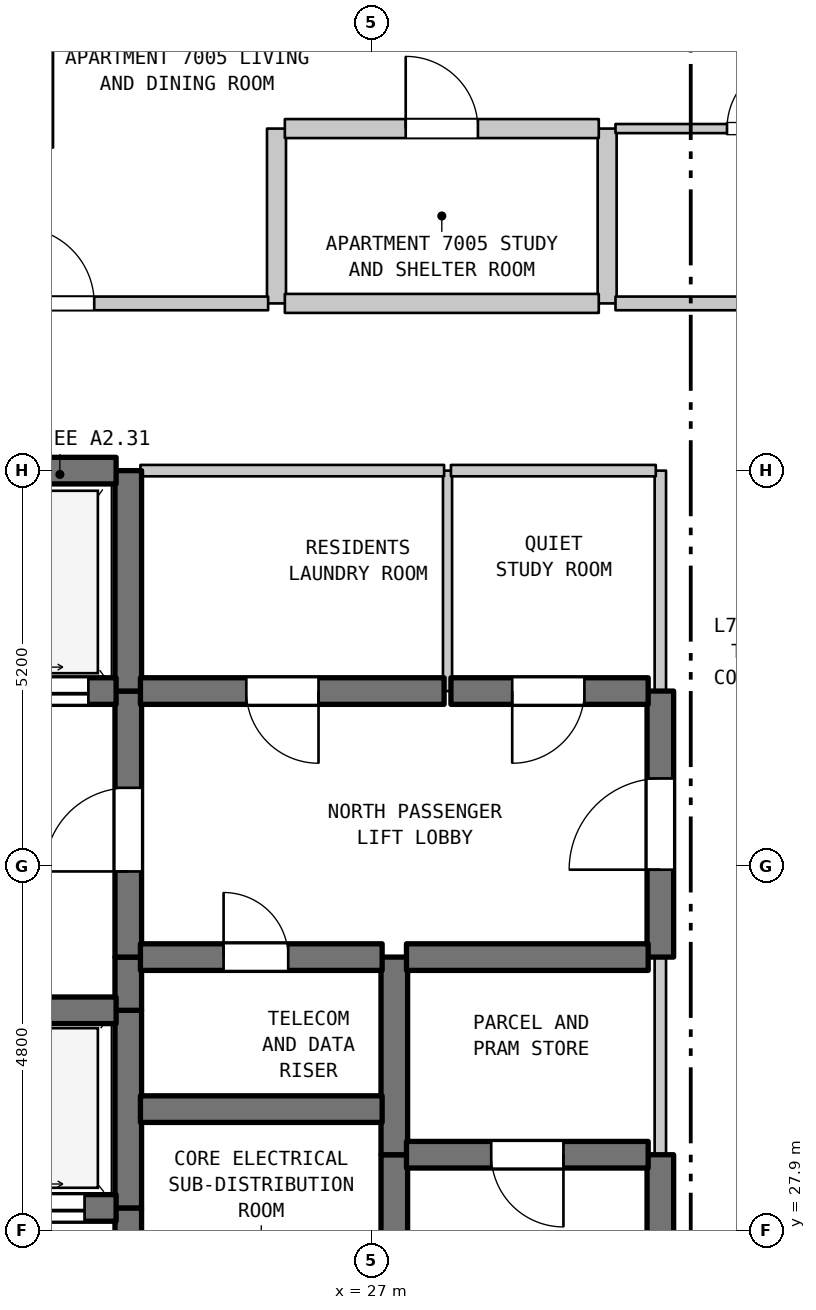
"""IFC4 building model, lengths in metres.
Left out: names, types, materials, properties, quantities, classifications, styles, units other than length and angle.
Written with IfcOpenShell. Run it as: python <this file> out.ifc"""

import sys

from ifc_helpers import new_model, si_unit, direction, frame, frame_2d, origin, place, context, subcontext, project, spatial, rectangle, extrude, element, fill, save


model = new_model("IFC4")
c1 = context("Model", 3, precision=1e-05, world=origin(), true_north=direction((0.0, 1.0)))
c2 = subcontext(c1, "Body", "Model", "MODEL_VIEW")
j1 = project(units=[si_unit("LENGTHUNIT", "METRE"), si_unit("PLANEANGLEUNIT", "RADIAN")], contexts=[c1])
p1 = place(None, origin())
s1 = spatial("IfcSite", under=j1, at=p1, CompositionType="ELEMENT")
p2 = place(p1, origin())
s2 = spatial("IfcBuilding", under=s1, at=p2, CompositionType="ELEMENT")
p3 = place(p2, frame((0.0, 0.0, 280.6)))
s3 = spatial("IfcBuildingStorey", under=s2, at=p3, CompositionType="ELEMENT", Elevation=280.6)
p4 = place(p3, frame((22.75, 42.15, 0.0), z_axis=(0.0, 0.0, 1.0), x_axis=(0.0, 1.0, 0.0)))
e1 = element("IfcWall", 1, at=p4, inside=s3, PredefinedType="PARTITIONING", context=c2, shape_type="SweptSolid", body=[
    extrude(rectangle(XDim=3.15, YDim=0.12, at=frame_2d((1.575, 0.0))), origin(), (0.0, 0.0, 1.0), 3.39),
])
p5 = place(p3, frame((23.8, 26.1, 0.0), z_axis=(0.0, 0.0, 1.0), x_axis=(0.0, 1.0, 0.0)))
e2 = element("IfcWall", 2, at=p5, inside=s3, PredefinedType="SHEAR", context=c2, shape_type="SweptSolid", body=[
    extrude(rectangle(XDim=2.1, YDim=0.35, at=frame_2d((1.05, 0.0))), origin(), (0.0, 0.0, 1.0), 3.39),
])
p6 = place(p5, frame((0.6, 0.0, 0.0)))
e3 = element("IfcOpeningElement", 3, at=p6, cuts=e2, PredefinedType="OPENING", context=c2, shape_type="SweptSolid", body=[
    extrude(rectangle(XDim=0.9, YDim=2.15, at=frame_2d((0.45, 1.075))), frame((0.0, 0.185, 0.0), z_axis=(0.0, -1.0, 0.0), x_axis=(1.0, 0.0, 0.0)), (0.0, 0.0, 1.0), 0.37),
])
p7 = place(p3, frame((23.8, 28.2, 0.0), z_axis=(0.0, 0.0, 1.0), x_axis=(0.0, 1.0, 0.0)))
e4 = element("IfcWall", 4, at=p7, inside=s3, PredefinedType="SHEAR", context=c2, shape_type="SweptSolid", body=[
    extrude(rectangle(XDim=2.6, YDim=0.35, at=frame_2d((1.3, 0.0))), origin(), (0.0, 0.0, 1.0), 3.39),
])
p8 = place(p3, frame((23.8, 30.8, 0.0), z_axis=(0.0, 0.0, 1.0), x_axis=(0.0, 1.0, 0.0)))
e5 = element("IfcWall", 5, at=p8, inside=s3, PredefinedType="SHEAR", context=c2, shape_type="SweptSolid", body=[
    extrude(rectangle(XDim=0.7, YDim=0.35, at=frame_2d((0.35, 0.0))), origin(), (0.0, 0.0, 1.0), 3.39),
])
p9 = place(p3, frame((23.8, 31.5, 0.0), z_axis=(0.0, 0.0, 1.0), x_axis=(0.0, 1.0, 0.0)))
e6 = element("IfcWall", 6, at=p9, inside=s3, PredefinedType="SHEAR", context=c2, shape_type="SweptSolid", body=[
    extrude(rectangle(XDim=3.5, YDim=0.35, at=frame_2d((1.75, 0.0))), origin(), (0.0, 0.0, 1.0), 3.39),
])
p10 = place(p9, frame((1.127, 0.0, 0.0)))
e7 = element("IfcOpeningElement", 7, at=p10, cuts=e6, PredefinedType="OPENING", context=c2, shape_type="SweptSolid", body=[
    extrude(rectangle(XDim=1.1, YDim=2.15, at=frame_2d((0.55, 1.075))), frame((0.0, 0.185, 0.0), z_axis=(0.0, -1.0, 0.0), x_axis=(1.0, 0.0, 0.0)), (0.0, 0.0, 1.0), 0.37),
])
p11 = place(p3, frame((23.8, 35.0, 0.0), z_axis=(0.0, 0.0, 1.0), x_axis=(0.0, 1.0, 0.0)))
e8 = element("IfcWall", 8, at=p11, inside=s3, PredefinedType="SHEAR", context=c2, shape_type="SweptSolid", body=[
    extrude(rectangle(XDim=2.9, YDim=0.35, at=frame_2d((1.45, 0.0))), origin(), (0.0, 0.0, 1.0), 3.39),
])
p12 = place(p3, frame((25.75, 40.1, 0.0), z_axis=(0.0, 0.0, 1.0), x_axis=(0.0, 1.0, 0.0)))
e9 = element("IfcWall", 9, at=p12, inside=s3, PredefinedType="STANDARD", context=c2, shape_type="SweptSolid", body=[
    extrude(rectangle(XDim=2.3, YDim=0.25, at=frame_2d((1.15, 0.0))), origin(), (0.0, 0.0, 1.0), 3.39),
])
p13 = place(p3, frame((27.3, 26.1, 0.0), z_axis=(0.0, 0.0, 1.0), x_axis=(0.0, 1.0, 0.0)))
e10 = element("IfcWall", 10, at=p13, inside=s3, PredefinedType="SHEAR", context=c2, shape_type="SweptSolid", body=[
    extrude(rectangle(XDim=2.8, YDim=0.35, at=frame_2d((1.4, 0.0))), origin(), (0.0, 0.0, 1.0), 3.39),
])
p14 = place(p3, frame((27.3, 28.9, 0.0), z_axis=(0.0, 0.0, 1.0), x_axis=(0.0, 1.0, 0.0)))
e11 = element("IfcWall", 11, at=p14, inside=s3, PredefinedType="SHEAR", context=c2, shape_type="SweptSolid", body=[
    extrude(rectangle(XDim=2.6, YDim=0.35, at=frame_2d((1.3, 0.0))), origin(), (0.0, 0.0, 1.0), 3.39),
])
p15 = place(p3, frame((28.0, 35.0, 0.0), z_axis=(0.0, 0.0, 1.0), x_axis=(0.0, 1.0, 0.0)))
e12 = element("IfcWall", 12, at=p15, inside=s3, PredefinedType="PARTITIONING", context=c2, shape_type="SweptSolid", body=[
    extrude(rectangle(XDim=2.9, YDim=0.12, at=frame_2d((1.45, 0.0))), origin(), (0.0, 0.0, 1.0), 3.39),
])
p16 = place(p3, frame((30.1, 40.1, 0.0), z_axis=(0.0, 0.0, 1.0), x_axis=(0.0, 1.0, 0.0)))
e13 = element("IfcWall", 13, at=p16, inside=s3, PredefinedType="STANDARD", context=c2, shape_type="SweptSolid", body=[
    extrude(rectangle(XDim=2.3, YDim=0.25, at=frame_2d((1.15, 0.0))), origin(), (0.0, 0.0, 1.0), 3.39),
])
p17 = place(p3, frame((30.8, 25.6, 0.0), z_axis=(0.0, 0.0, 1.0), x_axis=(0.0, 1.0, 0.0)))
e14 = element("IfcWall", 14, at=p17, inside=s3, PredefinedType="SHEAR", context=c2, shape_type="SweptSolid", body=[
    extrude(rectangle(XDim=3.3, YDim=0.35, at=frame_2d((1.65, 0.0))), origin(), (0.0, 0.0, 1.0), 3.39),
])
p18 = place(p17, frame((0.978, 0.0, 0.0)))
e15 = element("IfcOpeningElement", 15, at=p18, cuts=e14, PredefinedType="OPENING", context=c2, shape_type="SweptSolid", body=[
    extrude(rectangle(XDim=1.2, YDim=2.2, at=frame_2d((0.6, 1.1))), frame((0.0, 0.185, 0.0), z_axis=(0.0, -1.0, 0.0), x_axis=(1.0, 0.0, 0.0)), (0.0, 0.0, 1.0), 0.37),
])
p19 = place(p3, frame((30.8, 28.9, 0.0), z_axis=(0.0, 0.0, 1.0), x_axis=(0.0, 1.0, 0.0)))
e16 = element("IfcWall", 16, at=p19, inside=s3, PredefinedType="STANDARD", context=c2, shape_type="SweptSolid", body=[
    extrude(rectangle(XDim=2.6, YDim=0.15, at=frame_2d((1.3, 0.0))), origin(), (0.0, 0.0, 1.0), 3.39),
])
p20 = place(p3, frame((30.8, 31.5, 0.0), z_axis=(0.0, 0.0, 1.0), x_axis=(0.0, 1.0, 0.0)))
e17 = element("IfcWall", 17, at=p20, inside=s3, PredefinedType="SHEAR", context=c2, shape_type="SweptSolid", body=[
    extrude(rectangle(XDim=3.5, YDim=0.35, at=frame_2d((1.75, 0.0))), origin(), (0.0, 0.0, 1.0), 3.39),
])
p21 = place(p20, frame((1.15, 0.0, 0.0)))
e18 = element("IfcOpeningElement", 18, at=p21, cuts=e17, PredefinedType="OPENING", context=c2, shape_type="SweptSolid", body=[
    extrude(rectangle(XDim=1.2, YDim=2.2, at=frame_2d((0.6, 1.1))), frame((0.0, 0.185, 0.0), z_axis=(0.0, -1.0, 0.0), x_axis=(1.0, 0.0, 0.0)), (0.0, 0.0, 1.0), 0.37),
])
p22 = place(p3, frame((30.8, 35.0, 0.0), z_axis=(0.0, 0.0, 1.0), x_axis=(0.0, 1.0, 0.0)))
e19 = element("IfcWall", 19, at=p22, inside=s3, PredefinedType="STANDARD", context=c2, shape_type="SweptSolid", body=[
    extrude(rectangle(XDim=2.9, YDim=0.15, at=frame_2d((1.45, 0.0))), origin(), (0.0, 0.0, 1.0), 3.39),
])
p23 = place(p3, frame((19.16, 28.2, 0.0), z_axis=(0.0, 0.0, 1.0), x_axis=(1.0, 0.0, 0.0)))
e20 = element("IfcWall", 20, at=p23, inside=s3, PredefinedType="SHEAR", context=c2, shape_type="SweptSolid", body=[
    extrude(rectangle(XDim=4.48, YDim=0.35, at=frame_2d((2.24, 0.0))), origin(), (0.0, 0.0, 1.0), 3.39),
])
p24 = place(p23, frame((0.415, 0.0, 0.0)))
e21 = element("IfcOpeningElement", 21, at=p24, cuts=e20, PredefinedType="OPENING", context=c2, shape_type="SweptSolid", body=[
    extrude(rectangle(XDim=1.25, YDim=2.2, at=frame_2d((0.625, 1.1))), frame((0.0, 0.185, 0.0), z_axis=(0.0, -1.0, 0.0), x_axis=(1.0, 0.0, 0.0)), (0.0, 0.0, 1.0), 0.37),
])
p25 = place(p23, frame((2.815, 0.0, 0.0)))
e22 = element("IfcOpeningElement", 22, at=p25, cuts=e20, PredefinedType="OPENING", context=c2, shape_type="SweptSolid", body=[
    extrude(rectangle(XDim=1.25, YDim=2.2, at=frame_2d((0.625, 1.1))), frame((0.0, 0.185, 0.0), z_axis=(0.0, -1.0, 0.0), x_axis=(1.0, 0.0, 0.0)), (0.0, 0.0, 1.0), 0.37),
])
p26 = place(p3, frame((27.46, 28.9, 0.0), z_axis=(0.0, 0.0, 1.0), x_axis=(1.0, 0.0, 0.0)))
e23 = element("IfcWall", 23, at=p26, inside=s3, PredefinedType="SHEAR", context=c2, shape_type="SweptSolid", body=[
    extrude(rectangle(XDim=3.18, YDim=0.35, at=frame_2d((1.59, 0.0))), origin(), (0.0, 0.0, 1.0), 3.39),
])
p27 = place(p26, frame((1.115, 0.0, 0.0)))
e24 = element("IfcOpeningElement", 24, at=p27, cuts=e23, PredefinedType="OPENING", context=c2, shape_type="SweptSolid", body=[
    extrude(rectangle(XDim=0.95, YDim=2.15, at=frame_2d((0.475, 1.075))), frame((0.0, 0.185, 0.0), z_axis=(0.0, -1.0, 0.0), x_axis=(1.0, 0.0, 0.0)), (0.0, 0.0, 1.0), 0.37),
])
p28 = place(p3, frame((23.96, 29.5, 0.0), z_axis=(0.0, 0.0, 1.0), x_axis=(1.0, 0.0, 0.0)))
e25 = element("IfcWall", 25, at=p28, inside=s3, PredefinedType="SHEAR", context=c2, shape_type="SweptSolid", body=[
    extrude(rectangle(XDim=3.18, YDim=0.35, at=frame_2d((1.59, 0.0))), origin(), (0.0, 0.0, 1.0), 3.39),
])
p29 = place(p3, frame((19.16, 30.8, 0.0), z_axis=(0.0, 0.0, 1.0), x_axis=(1.0, 0.0, 0.0)))
e26 = element("IfcWall", 26, at=p29, inside=s3, PredefinedType="SHEAR", context=c2, shape_type="SweptSolid", body=[
    extrude(rectangle(XDim=4.48, YDim=0.35, at=frame_2d((2.24, 0.0))), origin(), (0.0, 0.0, 1.0), 3.39),
])
p30 = place(p3, frame((23.96, 31.5, 0.0), z_axis=(0.0, 0.0, 1.0), x_axis=(1.0, 0.0, 0.0)))
e27 = element("IfcWall", 27, at=p30, inside=s3, PredefinedType="SHEAR", context=c2, shape_type="SweptSolid", body=[
    extrude(rectangle(XDim=3.18, YDim=0.35, at=frame_2d((1.59, 0.0))), origin(), (0.0, 0.0, 1.0), 3.39),
])
p31 = place(p30, frame((1.094, 0.0, 0.0)))
e28 = element("IfcOpeningElement", 28, at=p31, cuts=e27, PredefinedType="OPENING", context=c2, shape_type="SweptSolid", body=[
    extrude(rectangle(XDim=0.85, YDim=2.1, at=frame_2d((0.425, 1.05))), frame((0.0, 0.185, 0.0), z_axis=(0.0, -1.0, 0.0), x_axis=(1.0, 0.0, 0.0)), (0.0, 0.0, 1.0), 0.37),
])
p32 = place(p3, frame((27.46, 31.5, 0.0), z_axis=(0.0, 0.0, 1.0), x_axis=(1.0, 0.0, 0.0)))
e29 = element("IfcWall", 29, at=p32, inside=s3, PredefinedType="SHEAR", context=c2, shape_type="SweptSolid", body=[
    extrude(rectangle(XDim=3.18, YDim=0.35, at=frame_2d((1.59, 0.0))), origin(), (0.0, 0.0, 1.0), 3.39),
])
p33 = place(p3, frame((19.16, 35.0, 0.0), z_axis=(0.0, 0.0, 1.0), x_axis=(1.0, 0.0, 0.0)))
e30 = element("IfcWall", 30, at=p33, inside=s3, PredefinedType="SHEAR", context=c2, shape_type="SweptSolid", body=[
    extrude(rectangle(XDim=4.48, YDim=0.35, at=frame_2d((2.24, 0.0))), origin(), (0.0, 0.0, 1.0), 3.39),
])
p34 = place(p33, frame((0.365, 0.0, 0.0)))
e31 = element("IfcOpeningElement", 31, at=p34, cuts=e30, PredefinedType="OPENING", context=c2, shape_type="SweptSolid", body=[
    extrude(rectangle(XDim=1.35, YDim=2.2, at=frame_2d((0.675, 1.1))), frame((0.0, 0.185, 0.0), z_axis=(0.0, -1.0, 0.0), x_axis=(1.0, 0.0, 0.0)), (0.0, 0.0, 1.0), 0.37),
])
p35 = place(p33, frame((2.765, 0.0, 0.0)))
e32 = element("IfcOpeningElement", 32, at=p35, cuts=e30, PredefinedType="OPENING", context=c2, shape_type="SweptSolid", body=[
    extrude(rectangle(XDim=1.35, YDim=2.2, at=frame_2d((0.675, 1.1))), frame((0.0, 0.185, 0.0), z_axis=(0.0, -1.0, 0.0), x_axis=(1.0, 0.0, 0.0)), (0.0, 0.0, 1.0), 0.37),
])
p36 = place(p3, frame((23.96, 35.0, 0.0), z_axis=(0.0, 0.0, 1.0), x_axis=(1.0, 0.0, 0.0)))
e33 = element("IfcWall", 33, at=p36, inside=s3, PredefinedType="SHEAR", context=c2, shape_type="SweptSolid", body=[
    extrude(rectangle(XDim=3.995, YDim=0.35, at=frame_2d((1.998, 0.0))), origin(), (0.0, 0.0, 1.0), 3.39),
])
p37 = place(p36, frame((1.393, 0.0, 0.0)))
e34 = element("IfcOpeningElement", 34, at=p37, cuts=e33, PredefinedType="OPENING", context=c2, shape_type="SweptSolid", body=[
    extrude(rectangle(XDim=0.95, YDim=2.15, at=frame_2d((0.475, 1.075))), frame((0.0, 0.185, 0.0), z_axis=(0.0, -1.0, 0.0), x_axis=(1.0, 0.0, 0.0)), (0.0, 0.0, 1.0), 0.37),
])
p38 = place(p3, frame((28.045, 35.0, 0.0), z_axis=(0.0, 0.0, 1.0), x_axis=(1.0, 0.0, 0.0)))
e35 = element("IfcWall", 35, at=p38, inside=s3, PredefinedType="SHEAR", context=c2, shape_type="SweptSolid", body=[
    extrude(rectangle(XDim=2.595, YDim=0.35, at=frame_2d((1.297, 0.0))), origin(), (0.0, 0.0, 1.0), 3.39),
])
p39 = place(p38, frame((0.806, 0.0, 0.0)))
e36 = element("IfcOpeningElement", 36, at=p39, cuts=e35, PredefinedType="OPENING", context=c2, shape_type="SweptSolid", body=[
    extrude(rectangle(XDim=0.95, YDim=2.15, at=frame_2d((0.475, 1.075))), frame((0.0, 0.185, 0.0), z_axis=(0.0, -1.0, 0.0), x_axis=(1.0, 0.0, 0.0)), (0.0, 0.0, 1.0), 0.37),
])
p40 = place(p3, frame((19.16, 37.9, 0.0), z_axis=(0.0, 0.0, 1.0), x_axis=(1.0, 0.0, 0.0)))
e37 = element("IfcWall", 37, at=p40, inside=s3, PredefinedType="SHEAR", context=c2, shape_type="SweptSolid", body=[
    extrude(rectangle(XDim=4.48, YDim=0.35, at=frame_2d((2.24, 0.0))), origin(), (0.0, 0.0, 1.0), 3.39),
])
p41 = place(p3, frame((23.96, 37.9, 0.0), z_axis=(0.0, 0.0, 1.0), x_axis=(1.0, 0.0, 0.0)))
e38 = element("IfcWall", 38, at=p41, inside=s3, PredefinedType="STANDARD", context=c2, shape_type="SweptSolid", body=[
    extrude(rectangle(XDim=3.995, YDim=0.15, at=frame_2d((1.998, 0.0))), origin(), (0.0, 0.0, 1.0), 2.89),
])
p42 = place(p3, frame((28.045, 37.9, 0.0), z_axis=(0.0, 0.0, 1.0), x_axis=(1.0, 0.0, 0.0)))
e39 = element("IfcWall", 39, at=p42, inside=s3, PredefinedType="STANDARD", context=c2, shape_type="SweptSolid", body=[
    extrude(rectangle(XDim=2.695, YDim=0.15, at=frame_2d((1.348, 0.0))), origin(), (0.0, 0.0, 1.0), 2.89),
])
p43 = place(p3, frame((20.545, 40.1, 0.0), z_axis=(0.0, 0.0, 1.0), x_axis=(1.0, 0.0, 0.0)))
e40 = element("IfcWall", 40, at=p43, inside=s3, PredefinedType="STANDARD", context=c2, shape_type="SweptSolid", body=[
    extrude(rectangle(XDim=5.095, YDim=0.18, at=frame_2d((2.547, 0.0))), origin(), (0.0, 0.0, 1.0), 3.39),
])
p44 = place(p43, frame((1.807, 0.0, 0.0)))
e41 = element("IfcOpeningElement", 41, at=p44, cuts=e40, PredefinedType="OPENING", context=c2, shape_type="SweptSolid", body=[
    extrude(rectangle(XDim=1.0, YDim=2.15, at=frame_2d((0.5, 1.075))), frame((0.0, 0.1, 0.0), z_axis=(0.0, -1.0, 0.0), x_axis=(1.0, 0.0, 0.0)), (0.0, 0.0, 1.0), 0.2),
])
p45 = place(p3, frame((25.86, 40.1, 0.0), z_axis=(0.0, 0.0, 1.0), x_axis=(1.0, 0.0, 0.0)))
e42 = element("IfcWall", 42, at=p45, inside=s3, PredefinedType="STANDARD", context=c2, shape_type="SweptSolid", body=[
    extrude(rectangle(XDim=4.13, YDim=0.25, at=frame_2d((2.065, 0.0))), origin(), (0.0, 0.0, 1.0), 3.39),
])
p46 = place(p3, frame((30.21, 40.1, 0.0), z_axis=(0.0, 0.0, 1.0), x_axis=(1.0, 0.0, 0.0)))
e43 = element("IfcWall", 43, at=p46, inside=s3, PredefinedType="STANDARD", context=c2, shape_type="SweptSolid", body=[
    extrude(rectangle(XDim=2.715, YDim=0.18, at=frame_2d((1.357, 0.0))), origin(), (0.0, 0.0, 1.0), 3.39),
])
p47 = place(p3, frame((25.86, 42.4, 0.0), z_axis=(0.0, 0.0, 1.0), x_axis=(1.0, 0.0, 0.0)))
e44 = element("IfcWall", 44, at=p47, inside=s3, PredefinedType="STANDARD", context=c2, shape_type="SweptSolid", body=[
    extrude(rectangle(XDim=4.13, YDim=0.25, at=frame_2d((2.065, 0.0))), origin(), (0.0, 0.0, 1.0), 3.39),
])
p48 = place(p47, frame((1.59, 0.0, 0.0)))
e45 = element("IfcOpeningElement", 45, at=p48, cuts=e44, PredefinedType="OPENING", context=c2, shape_type="SweptSolid", body=[
    extrude(rectangle(XDim=0.95, YDim=2.15, at=frame_2d((0.475, 1.075))), frame((0.0, 0.135, 0.0), z_axis=(0.0, -1.0, 0.0), x_axis=(1.0, 0.0, 0.0)), (0.0, 0.0, 1.0), 0.27),
])
p49 = place(p3, frame((30.21, 42.4, 0.0), z_axis=(0.0, 0.0, 1.0), x_axis=(1.0, 0.0, 0.0)))
e46 = element("IfcWall", 46, at=p49, inside=s3, PredefinedType="PARTITIONING", context=c2, shape_type="SweptSolid", body=[
    extrude(rectangle(XDim=4.045, YDim=0.12, at=frame_2d((2.022, 0.0))), origin(), (0.0, 0.0, 1.0), 3.39),
])
p50 = place(p49, frame((1.467, 0.0, 0.0)))
e47 = element("IfcOpeningElement", 47, at=p50, cuts=e46, PredefinedType="OPENING", context=c2, shape_type="SweptSolid", body=[
    extrude(rectangle(XDim=0.9, YDim=2.1, at=frame_2d((0.45, 1.05))), frame((0.0, 0.07, 0.0), z_axis=(0.0, -1.0, 0.0), x_axis=(1.0, 0.0, 0.0)), (0.0, 0.0, 1.0), 0.14),
])
p51 = place(p10, origin())
e48 = element("IfcDoor", 48, at=p51, inside=s3, OperationType="SINGLE_SWING_LEFT", PredefinedType="DOOR", context=c2, shape_type="SweptSolid", body=[
    extrude(rectangle(XDim=1.1, YDim=2.15, at=frame_2d((0.55, 1.075))), frame((0.0, 0.025, 0.0), z_axis=(0.0, -1.0, 0.0), x_axis=(1.0, 0.0, 0.0)), (0.0, 0.0, 1.0), 0.05),
])
fill(e7, e48)
p52 = place(p21, origin())
e49 = element("IfcDoor", 49, at=p52, inside=s3, OperationType="SINGLE_SWING_LEFT", PredefinedType="DOOR", context=c2, shape_type="SweptSolid", body=[
    extrude(rectangle(XDim=1.2, YDim=2.2, at=frame_2d((0.6, 1.1))), frame((0.0, 0.025, 0.0), z_axis=(0.0, -1.0, 0.0), x_axis=(1.0, 0.0, 0.0)), (0.0, 0.0, 1.0), 0.05),
])
fill(e18, e49)
p53 = place(p25, origin())
e50 = element("IfcDoor", 50, at=p53, inside=s3, OperationType="DOUBLE_DOOR_SLIDING", PredefinedType="DOOR", context=c2, shape_type="SweptSolid", body=[
    extrude(rectangle(XDim=1.25, YDim=2.2, at=frame_2d((0.625, 1.1))), frame((0.0, 0.025, 0.0), z_axis=(0.0, -1.0, 0.0), x_axis=(1.0, 0.0, 0.0)), (0.0, 0.0, 1.0), 0.05),
])
fill(e22, e50)
p54 = place(p27, frame((0.95, 0.0, 0.0), z_axis=(0.0, 0.0, 1.0), x_axis=(-1.0, 0.0, 0.0)))
e51 = element("IfcDoor", 51, at=p54, inside=s3, OperationType="SINGLE_SWING_RIGHT", PredefinedType="DOOR", context=c2, shape_type="SweptSolid", body=[
    extrude(rectangle(XDim=0.95, YDim=2.15, at=frame_2d((0.475, 1.075))), frame((0.0, 0.025, 0.0), z_axis=(0.0, -1.0, 0.0), x_axis=(1.0, 0.0, 0.0)), (0.0, 0.0, 1.0), 0.05),
])
fill(e24, e51)
p55 = place(p31, origin())
e52 = element("IfcDoor", 52, at=p55, inside=s3, OperationType="SINGLE_SWING_LEFT", PredefinedType="DOOR", context=c2, shape_type="SweptSolid", body=[
    extrude(rectangle(XDim=0.85, YDim=2.1, at=frame_2d((0.425, 1.05))), frame((0.0, 0.025, 0.0), z_axis=(0.0, -1.0, 0.0), x_axis=(1.0, 0.0, 0.0)), (0.0, 0.0, 1.0), 0.05),
])
fill(e28, e52)
p56 = place(p35, origin())
e53 = element("IfcDoor", 53, at=p56, inside=s3, OperationType="DOUBLE_DOOR_SLIDING", PredefinedType="DOOR", context=c2, shape_type="SweptSolid", body=[
    extrude(rectangle(XDim=1.35, YDim=2.2, at=frame_2d((0.675, 1.1))), frame((0.0, 0.025, 0.0), z_axis=(0.0, -1.0, 0.0), x_axis=(1.0, 0.0, 0.0)), (0.0, 0.0, 1.0), 0.05),
])
fill(e32, e53)
p57 = place(p37, frame((0.95, 0.0, 0.0), z_axis=(0.0, 0.0, 1.0), x_axis=(-1.0, 0.0, 0.0)))
e54 = element("IfcDoor", 54, at=p57, inside=s3, OperationType="SINGLE_SWING_RIGHT", PredefinedType="DOOR", context=c2, shape_type="SweptSolid", body=[
    extrude(rectangle(XDim=0.95, YDim=2.15, at=frame_2d((0.475, 1.075))), frame((0.0, 0.025, 0.0), z_axis=(0.0, -1.0, 0.0), x_axis=(1.0, 0.0, 0.0)), (0.0, 0.0, 1.0), 0.05),
])
fill(e34, e54)
p58 = place(p39, frame((0.95, 0.0, 0.0), z_axis=(0.0, 0.0, 1.0), x_axis=(-1.0, 0.0, 0.0)))
e55 = element("IfcDoor", 55, at=p58, inside=s3, OperationType="SINGLE_SWING_LEFT", PredefinedType="DOOR", context=c2, shape_type="SweptSolid", body=[
    extrude(rectangle(XDim=0.95, YDim=2.15, at=frame_2d((0.475, 1.075))), frame((0.0, 0.025, 0.0), z_axis=(0.0, -1.0, 0.0), x_axis=(1.0, 0.0, 0.0)), (0.0, 0.0, 1.0), 0.05),
])
fill(e36, e55)
p59 = place(p44, origin())
e56 = element("IfcDoor", 56, at=p59, inside=s3, OperationType="SINGLE_SWING_LEFT", PredefinedType="DOOR", context=c2, shape_type="SweptSolid", body=[
    extrude(rectangle(XDim=1.0, YDim=2.15, at=frame_2d((0.5, 1.075))), frame((0.0, 0.025, 0.0), z_axis=(0.0, -1.0, 0.0), x_axis=(1.0, 0.0, 0.0)), (0.0, 0.0, 1.0), 0.05),
])
fill(e41, e56)
p60 = place(p48, origin())
e57 = element("IfcDoor", 57, at=p60, inside=s3, OperationType="SINGLE_SWING_LEFT", PredefinedType="DOOR", context=c2, shape_type="SweptSolid", body=[
    extrude(rectangle(XDim=0.95, YDim=2.15, at=frame_2d((0.475, 1.075))), frame((0.0, 0.025, 0.0), z_axis=(0.0, -1.0, 0.0), x_axis=(1.0, 0.0, 0.0)), (0.0, 0.0, 1.0), 0.05),
])
fill(e45, e57)
p61 = place(p50, origin())
e58 = element("IfcDoor", 58, at=p61, inside=s3, OperationType="SINGLE_SWING_RIGHT", PredefinedType="DOOR", context=c2, shape_type="SweptSolid", body=[
    extrude(rectangle(XDim=0.9, YDim=2.1, at=frame_2d((0.45, 1.05))), frame((0.0, 0.025, 0.0), z_axis=(0.0, -1.0, 0.0), x_axis=(1.0, 0.0, 0.0)), (0.0, 0.0, 1.0), 0.05),
])
fill(e47, e58)
save(model, sys.argv[1])
